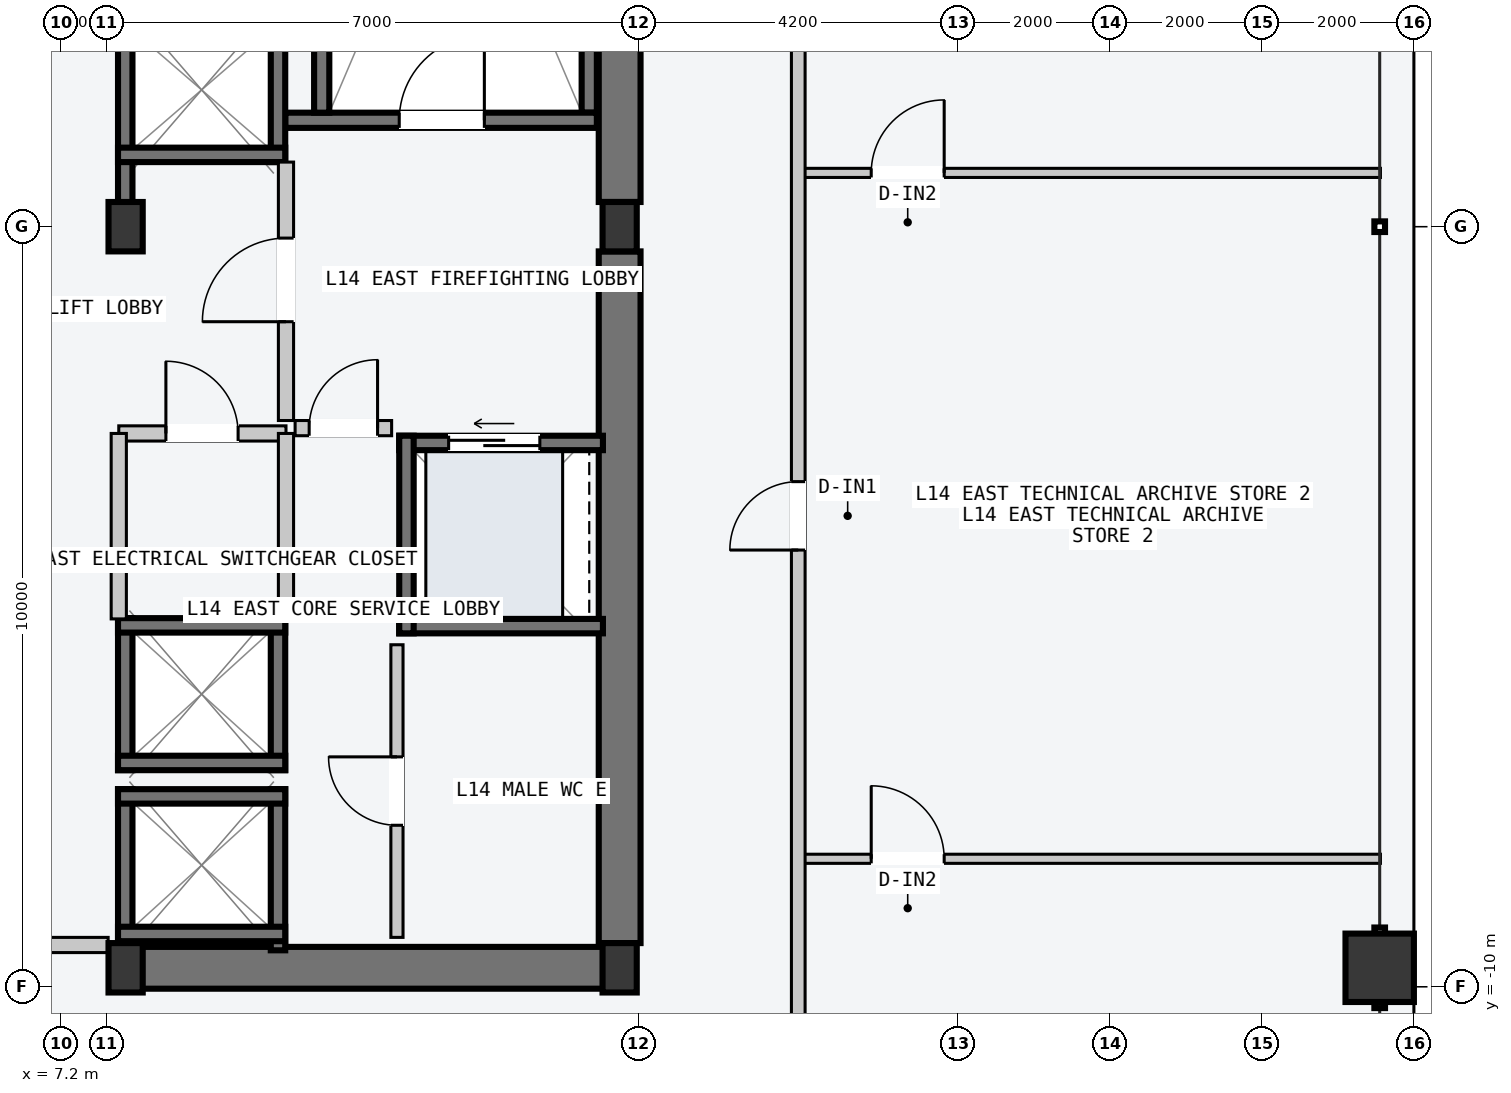
"""IFC4 building model, lengths in metres.
Left out: names, types, materials, properties, quantities, classifications, styles, units other than length and angle.
Written with IfcOpenShell. Run it as: python <this file> out.ifc"""

import sys

from ifc_helpers import new_model, si_unit, direction, frame, frame_2d, origin, origin_2d, place, context, subcontext, project, spatial, rectangle, hollow_rectangle, i_section, extrude, element, fill, save


model = new_model("IFC4")
c1 = context("Model", 3, precision=1e-05, world=origin(), true_north=direction((0.0, 1.0)))
c2 = subcontext(c1, "Body", "Model", "MODEL_VIEW")
j1 = project(units=[si_unit("LENGTHUNIT", "METRE"), si_unit("PLANEANGLEUNIT", "RADIAN")], contexts=[c1])
p1 = place(None, origin())
s1 = spatial("IfcSite", under=j1, at=p1, CompositionType="ELEMENT")
p2 = place(p1, origin())
s2 = spatial("IfcBuilding", under=s1, at=p2, CompositionType="ELEMENT")
p3 = place(p2, frame((0.0, 0.0, 56.4)))
s3 = spatial("IfcBuildingStorey", under=s2, at=p3, CompositionType="ELEMENT", Elevation=56.4)
p4 = place(p3, frame((8.07, -9.75, -0.2), z_axis=(0.0, 0.0, 1.0), x_axis=(1.0, 0.0, 0.0)))
e1 = element("IfcWall", 1, at=p4, inside=s3, PredefinedType="SHEAR", context=c2, shape_type="SweptSolid", body=[
    extrude(rectangle(XDim=6.46, YDim=0.55, at=frame_2d((3.23, 0.0))), origin(), (0.0, 0.0, 1.0), 3.6),
])
for number, where, z_axis, x_axis in (
    (2, (14.55, -9.425, -0.2), (0.0, 0.0, 1.0), (0.0, 1.0, 0.0)),
    (3, (14.55, 0.325, -0.2), (0.0, 0.0, 1.0), (0.0, 1.0, 0.0)),
):
    element("IfcWall", number, at=place(p3, frame(where, z_axis=z_axis, x_axis=x_axis)), inside=s3, PredefinedType="SHEAR", context=c2, shape_type="SweptSolid", body=[
        extrude(rectangle(XDim=9.1, YDim=0.55, at=frame_2d((4.55, 0.0))), origin(), (0.0, 0.0, 1.0), 3.6),
    ])
p5 = place(p3, frame((14.15, 1.5, -0.2), z_axis=(0.0, 0.0, 1.0), x_axis=(0.0, 1.0, 0.0)))
e4 = element("IfcWall", 4, at=p5, inside=s3, PredefinedType="SOLIDWALL", context=c2, shape_type="SweptSolid", body=[
    extrude(rectangle(XDim=7.8, YDim=0.2, at=frame_2d((3.9, 0.0))), origin(), (0.0, 0.0, 1.0), 3.6),
])
p6 = place(p3, frame((10.15, 1.4, -0.2), z_axis=(0.0, 0.0, 1.0), x_axis=(1.0, 0.0, 0.0)))
e5 = element("IfcWall", 5, at=p6, inside=s3, PredefinedType="SOLIDWALL", context=c2, shape_type="SweptSolid", body=[
    extrude(rectangle(XDim=4.1, YDim=0.2, at=frame_2d((2.05, 0.0))), origin(), (0.0, 0.0, 1.0), 3.6),
])
p7 = place(p6, frame((1.5, 0.0, 0.2)))
e6 = element("IfcOpeningElement", 6, at=p7, cuts=e5, PredefinedType="OPENING", context=c2, shape_type="SweptSolid", body=[
    extrude(rectangle(XDim=1.12, YDim=2.18, at=frame_2d((0.56, 1.09))), frame((0.0, 0.11, 0.0), z_axis=(0.0, -1.0, 0.0), x_axis=(1.0, 0.0, 0.0)), (0.0, 0.0, 1.0), 0.22),
])
p8 = place(p3, frame((10.63, 1.5, -0.2), z_axis=(0.0, 0.0, 1.0), x_axis=(0.0, 1.0, 0.0)))
e7 = element("IfcWall", 7, at=p8, inside=s3, PredefinedType="SOLIDWALL", context=c2, shape_type="SweptSolid", body=[
    extrude(rectangle(XDim=7.8, YDim=0.2, at=frame_2d((3.9, 0.0))), origin(), (0.0, 0.0, 1.0), 3.6),
])
for number, where, z_axis, x_axis in (
    (8, (8.05, -9.75, 0.0), (0.0, 0.0, 1.0), (1.0, 0.0, 0.0)),
    (9, (8.05, 0.0, 0.0), (0.0, 0.0, 1.0), (1.0, 0.0, 0.0)),
    (10, (14.55, -9.75, 0.0), (0.0, 0.0, 1.0), (1.0, 0.0, 0.0)),
    (11, (14.55, 0.0, 0.0), (0.0, 0.0, 1.0), (1.0, 0.0, 0.0)),
):
    element("IfcColumn", number, at=place(p3, frame(where, z_axis=z_axis, x_axis=x_axis)), inside=s3, PredefinedType="COLUMN", context=c2, shape_type="SweptSolid", body=[
        extrude(i_section(OverallWidth=0.45, OverallDepth=0.65, WebThickness=0.025, FlangeThickness=0.04, at=origin_2d()), origin(), (0.0, 0.0, 1.0), 3.6),
    ])
p9 = place(p3, frame((24.55, -9.75, 0.0), z_axis=(0.0, 0.0, 1.0), x_axis=(0.0, 1.0, 0.0)))
e12 = element("IfcColumn", 12, at=p9, inside=s3, PredefinedType="COLUMN", context=c2, shape_type="SweptSolid", body=[
    extrude(hollow_rectangle(XDim=0.9, YDim=0.9, WallThickness=0.045, at=origin_2d()), origin(), (0.0, 0.0, 1.0), 3.6),
])
p10 = place(p3, frame((8.045, 0.21, -0.2), z_axis=(0.0, 0.0, 1.0), x_axis=(0.0, 1.0, 0.0)))
e13 = element("IfcWall", 13, at=p10, inside=s3, PredefinedType="SOLIDWALL", context=c2, shape_type="SweptSolid", body=[
    extrude(rectangle(XDim=2.54, YDim=0.19, at=frame_2d((1.27, 0.0))), origin(), (0.0, 0.0, 1.0), 3.6),
])
p11 = place(p3, frame((10.055, 0.85, -0.2), z_axis=(0.0, 0.0, 1.0), x_axis=(0.0, 1.0, 0.0)))
e14 = element("IfcWall", 14, at=p11, inside=s3, PredefinedType="SOLIDWALL", context=c2, shape_type="SweptSolid", body=[
    extrude(rectangle(XDim=1.9, YDim=0.19, at=frame_2d((0.95, 0.0))), origin(), (0.0, 0.0, 1.0), 3.6),
])
p12 = place(p3, frame((7.95, 0.945, -0.2), z_axis=(0.0, 0.0, 1.0), x_axis=(1.0, 0.0, 0.0)))
e15 = element("IfcWall", 15, at=p12, inside=s3, PredefinedType="SOLIDWALL", context=c2, shape_type="SweptSolid", body=[
    extrude(rectangle(XDim=2.2, YDim=0.19, at=frame_2d((1.1, 0.0))), origin(), (0.0, 0.0, 1.0), 3.6),
])
for number, where, z_axis, x_axis in (
    (16, (8.045, -9.52, -0.2), (0.0, 0.0, 1.0), (0.0, 1.0, 0.0)),
    (17, (10.055, -9.52, -0.2), (0.0, 0.0, 1.0), (0.0, 1.0, 0.0)),
):
    element("IfcWall", number, at=place(p3, frame(where, z_axis=z_axis, x_axis=x_axis)), inside=s3, PredefinedType="SOLIDWALL", context=c2, shape_type="SweptSolid", body=[
        extrude(rectangle(XDim=2.12, YDim=0.19, at=frame_2d((1.06, 0.0))), origin(), (0.0, 0.0, 1.0), 3.6),
    ])
for number, where, z_axis, x_axis in (
    (18, (7.95, -7.495, -0.2), (0.0, 0.0, 1.0), (1.0, 0.0, 0.0)),
    (19, (7.95, -9.305, -0.2), (0.0, 0.0, 1.0), (1.0, 0.0, 0.0)),
):
    element("IfcWall", number, at=place(p3, frame(where, z_axis=z_axis, x_axis=x_axis)), inside=s3, PredefinedType="SOLIDWALL", context=c2, shape_type="SweptSolid", body=[
        extrude(rectangle(XDim=2.2, YDim=0.19, at=frame_2d((1.1, 0.0))), origin(), (0.0, 0.0, 1.0), 3.6),
    ])
for number, where, z_axis, x_axis in (
    (20, (8.045, -7.15, -0.2), (0.0, 0.0, 1.0), (0.0, 1.0, 0.0)),
    (21, (10.055, -7.15, -0.2), (0.0, 0.0, 1.0), (0.0, 1.0, 0.0)),
):
    element("IfcWall", number, at=place(p3, frame(where, z_axis=z_axis, x_axis=x_axis)), inside=s3, PredefinedType="SOLIDWALL", context=c2, shape_type="SweptSolid", body=[
        extrude(rectangle(XDim=2.0, YDim=0.19, at=frame_2d((1.0, 0.0))), origin(), (0.0, 0.0, 1.0), 3.6),
    ])
for number, where, z_axis, x_axis in (
    (22, (7.95, -5.245, -0.2), (0.0, 0.0, 1.0), (1.0, 0.0, 0.0)),
    (23, (7.95, -7.055, -0.2), (0.0, 0.0, 1.0), (1.0, 0.0, 0.0)),
):
    element("IfcWall", number, at=place(p3, frame(where, z_axis=z_axis, x_axis=x_axis)), inside=s3, PredefinedType="SOLIDWALL", context=c2, shape_type="SweptSolid", body=[
        extrude(rectangle(XDim=2.2, YDim=0.19, at=frame_2d((1.1, 0.0))), origin(), (0.0, 0.0, 1.0), 3.6),
    ])
p13 = place(p3, frame((11.65, -2.845, -0.2), z_axis=(0.0, 0.0, 1.0), x_axis=(1.0, 0.0, 0.0)))
e24 = element("IfcWall", 24, at=p13, inside=s3, PredefinedType="SOLIDWALL", context=c2, shape_type="SweptSolid", body=[
    extrude(rectangle(XDim=2.68, YDim=0.19, at=frame_2d((1.34, 0.0))), origin(), (0.0, 0.0, 1.0), 3.6),
])
p14 = place(p13, frame((0.65, 0.0, 0.2)))
e25 = element("IfcOpeningElement", 25, at=p14, cuts=e24, PredefinedType="OPENING", context=c2, shape_type="SweptSolid", body=[
    extrude(rectangle(XDim=1.2, YDim=2.2, at=frame_2d((0.6, 1.1))), frame((0.0, 0.105, 0.0), z_axis=(0.0, -1.0, 0.0), x_axis=(1.0, 0.0, 0.0)), (0.0, 0.0, 1.0), 0.21),
])
p15 = place(p3, frame((11.65, -5.255, -0.2), z_axis=(0.0, 0.0, 1.0), x_axis=(1.0, 0.0, 0.0)))
e26 = element("IfcWall", 26, at=p15, inside=s3, PredefinedType="SOLIDWALL", context=c2, shape_type="SweptSolid", body=[
    extrude(rectangle(XDim=2.68, YDim=0.19, at=frame_2d((1.34, 0.0))), origin(), (0.0, 0.0, 1.0), 3.6),
])
p16 = place(p3, frame((11.745, -5.35, -0.2), z_axis=(0.0, 0.0, 1.0), x_axis=(0.0, 1.0, 0.0)))
e27 = element("IfcWall", 27, at=p16, inside=s3, PredefinedType="SOLIDWALL", context=c2, shape_type="SweptSolid", body=[
    extrude(rectangle(XDim=2.6, YDim=0.19, at=frame_2d((1.3, 0.0))), origin(), (0.0, 0.0, 1.0), 3.6),
])
p17 = place(p3, frame((6.02, -9.45, 0.0), z_axis=(0.0, 0.0, 1.0), x_axis=(1.0, 0.0, 0.0)))
e28 = element("IfcWall", 28, at=p17, inside=s3, PredefinedType="PARTITIONING", context=c2, shape_type="SweptSolid", body=[
    extrude(rectangle(XDim=1.8, YDim=0.2, at=frame_2d((0.9, 0.0))), origin(), (0.0, 0.0, 1.0), 3.4),
])
p18 = place(p3, frame((10.16, -2.55, 0.0), z_axis=(0.0, 0.0, 1.0), x_axis=(0.0, 1.0, 0.0)))
e29 = element("IfcWall", 29, at=p18, inside=s3, PredefinedType="PARTITIONING", context=c2, shape_type="SweptSolid", body=[
    extrude(rectangle(XDim=3.4, YDim=0.2, at=frame_2d((1.7, 0.0))), origin(), (0.0, 0.0, 1.0), 3.4),
])
p19 = place(p18, frame((1.3, 0.0, 0.0)))
e30 = element("IfcOpeningElement", 30, at=p19, cuts=e29, PredefinedType="OPENING", context=c2, shape_type="SweptSolid", body=[
    extrude(rectangle(XDim=1.1, YDim=2.15, at=frame_2d((0.55, 1.075))), frame((0.0, 0.11, 0.0), z_axis=(0.0, -1.0, 0.0), x_axis=(1.0, 0.0, 0.0)), (0.0, 0.0, 1.0), 0.22),
])
p20 = place(p3, frame((10.28, -2.65, 0.0), z_axis=(0.0, 0.0, 1.0), x_axis=(1.0, 0.0, 0.0)))
e31 = element("IfcWall", 31, at=p20, inside=s3, PredefinedType="PARTITIONING", context=c2, shape_type="SweptSolid", body=[
    extrude(rectangle(XDim=1.27, YDim=0.2, at=frame_2d((0.635, 0.0))), origin(), (0.0, 0.0, 1.0), 3.4),
])
p21 = place(p20, frame((0.185, 0.0, 0.0)))
e32 = element("IfcOpeningElement", 32, at=p21, cuts=e31, PredefinedType="OPENING", context=c2, shape_type="SweptSolid", body=[
    extrude(rectangle(XDim=0.9, YDim=2.15, at=frame_2d((0.45, 1.075))), frame((0.0, 0.11, 0.0), z_axis=(0.0, -1.0, 0.0), x_axis=(1.0, 0.0, 0.0)), (0.0, 0.0, 1.0), 0.22),
])
p22 = place(p3, frame((7.96, -2.72, 0.0), z_axis=(0.0, 0.0, 1.0), x_axis=(1.0, 0.0, 0.0)))
e33 = element("IfcWall", 33, at=p22, inside=s3, PredefinedType="PARTITIONING", context=c2, shape_type="SweptSolid", body=[
    extrude(rectangle(XDim=2.2, YDim=0.2, at=frame_2d((1.1, 0.0))), origin(), (0.0, 0.0, 1.0), 3.4),
])
p23 = place(p22, frame((0.62, 0.0, 0.0)))
e34 = element("IfcOpeningElement", 34, at=p23, cuts=e33, PredefinedType="OPENING", context=c2, shape_type="SweptSolid", body=[
    extrude(rectangle(XDim=0.95, YDim=2.1, at=frame_2d((0.475, 1.05))), frame((0.0, 0.11, 0.0), z_axis=(0.0, -1.0, 0.0), x_axis=(1.0, 0.0, 0.0)), (0.0, 0.0, 1.0), 0.22),
])
for number, where, z_axis, x_axis in (
    (35, (7.96, -5.16, 0.0), (0.0, 0.0, 1.0), (0.0, 1.0, 0.0)),
    (36, (10.16, -5.16, 0.0), (0.0, 0.0, 1.0), (0.0, 1.0, 0.0)),
):
    element("IfcWall", number, at=place(p3, frame(where, z_axis=z_axis, x_axis=x_axis)), inside=s3, PredefinedType="PARTITIONING", context=c2, shape_type="SweptSolid", body=[
        extrude(rectangle(XDim=2.44, YDim=0.2, at=frame_2d((1.22, 0.0))), origin(), (0.0, 0.0, 1.0), 3.4),
    ])
p24 = place(p3, frame((11.62, -9.35, 0.0), z_axis=(0.0, 0.0, 1.0), x_axis=(0.0, 1.0, 0.0)))
e37 = element("IfcWall", 37, at=p24, inside=s3, PredefinedType="PARTITIONING", context=c2, shape_type="SweptSolid", body=[
    extrude(rectangle(XDim=3.85, YDim=0.16, at=frame_2d((1.925, 0.0))), origin(), (0.0, 0.0, 1.0), 3.4),
])
p25 = place(p24, frame((1.475, 0.0, 0.0)))
e38 = element("IfcOpeningElement", 38, at=p25, cuts=e37, PredefinedType="OPENING", context=c2, shape_type="SweptSolid", body=[
    extrude(rectangle(XDim=0.9, YDim=2.15, at=frame_2d((0.45, 1.075))), frame((0.0, 0.09, 0.0), z_axis=(0.0, -1.0, 0.0), x_axis=(1.0, 0.0, 0.0)), (0.0, 0.0, 1.0), 0.18),
])
p26 = place(p3, frame((16.96, -8.316, 0.0), z_axis=(0.0, 0.0, 1.0), x_axis=(1.0, 0.0, 0.0)))
e39 = element("IfcWall", 39, at=p26, inside=s3, PredefinedType="PARTITIONING", context=c2, shape_type="SweptSolid", body=[
    extrude(rectangle(XDim=7.6, YDim=0.12, at=frame_2d((3.8, 0.0))), origin(), (0.0, 0.0, 1.0), 3.4),
])
p27 = place(p26, frame((0.9, 0.0, 0.0)))
e40 = element("IfcOpeningElement", 40, at=p27, cuts=e39, PredefinedType="OPENING", context=c2, shape_type="SweptSolid", body=[
    extrude(rectangle(XDim=0.96, YDim=2.18, at=frame_2d((0.48, 1.09))), frame((0.0, 0.07, 0.0), z_axis=(0.0, -1.0, 0.0), x_axis=(1.0, 0.0, 0.0)), (0.0, 0.0, 1.0), 0.14),
])
p28 = place(p3, frame((16.96, 0.708, 0.0), z_axis=(0.0, 0.0, 1.0), x_axis=(1.0, 0.0, 0.0)))
e41 = element("IfcWall", 41, at=p28, inside=s3, PredefinedType="PARTITIONING", context=c2, shape_type="SweptSolid", body=[
    extrude(rectangle(XDim=7.6, YDim=0.12, at=frame_2d((3.8, 0.0))), origin(), (0.0, 0.0, 1.0), 3.4),
])
p29 = place(p28, frame((0.9, 0.0, 0.0)))
e42 = element("IfcOpeningElement", 42, at=p29, cuts=e41, PredefinedType="OPENING", context=c2, shape_type="SweptSolid", body=[
    extrude(rectangle(XDim=0.96, YDim=2.18, at=frame_2d((0.48, 1.09))), frame((0.0, 0.07, 0.0), z_axis=(0.0, -1.0, 0.0), x_axis=(1.0, 0.0, 0.0)), (0.0, 0.0, 1.0), 0.14),
])
p30 = place(p3, frame((16.9, -14.42, 0.0), z_axis=(0.0, 0.0, 1.0), x_axis=(0.0, 1.0, 0.0)))
e43 = element("IfcWall", 43, at=p30, inside=s3, PredefinedType="PARTITIONING", context=c2, shape_type="SweptSolid", body=[
    extrude(rectangle(XDim=26.54, YDim=0.18, at=frame_2d((13.27, 0.0))), origin(), (0.0, 0.0, 1.0), 3.4),
])
p31 = place(p30, frame((2.352, 0.0, 0.0)))
e44 = element("IfcOpeningElement", 44, at=p31, cuts=e43, PredefinedType="OPENING", context=c2, shape_type="SweptSolid", body=[
    extrude(rectangle(XDim=1.4, YDim=2.2, at=frame_2d((0.7, 1.1))), frame((0.0, 0.1, 0.0), z_axis=(0.0, -1.0, 0.0), x_axis=(1.0, 0.0, 0.0)), (0.0, 0.0, 1.0), 0.2),
])
p32 = place(p30, frame((10.166, 0.0, 0.0)))
e45 = element("IfcOpeningElement", 45, at=p32, cuts=e43, PredefinedType="OPENING", context=c2, shape_type="SweptSolid", body=[
    extrude(rectangle(XDim=0.9, YDim=2.15, at=frame_2d((0.45, 1.075))), frame((0.0, 0.1, 0.0), z_axis=(0.0, -1.0, 0.0), x_axis=(1.0, 0.0, 0.0)), (0.0, 0.0, 1.0), 0.2),
])
p33 = place(p30, frame((20.354, 0.0, 0.0)))
e46 = element("IfcOpeningElement", 46, at=p33, cuts=e43, PredefinedType="OPENING", context=c2, shape_type="SweptSolid", body=[
    extrude(rectangle(XDim=0.96, YDim=2.18, at=frame_2d((0.48, 1.09))), frame((0.0, 0.1, 0.0), z_axis=(0.0, -1.0, 0.0), x_axis=(1.0, 0.0, 0.0)), (0.0, 0.0, 1.0), 0.2),
])
p34 = place(p7, origin())
e47 = element("IfcDoor", 47, at=p34, inside=s3, OperationType="SINGLE_SWING_RIGHT", PredefinedType="DOOR", context=c2, shape_type="SweptSolid", body=[
    extrude(rectangle(XDim=1.12, YDim=2.18, at=frame_2d((0.56, 1.09))), frame((0.0, 0.025, 0.0), z_axis=(0.0, -1.0, 0.0), x_axis=(1.0, 0.0, 0.0)), (0.0, 0.0, 1.0), 0.05),
])
fill(e6, e47)
p35 = place(p14, origin())
e48 = element("IfcDoor", 48, at=p35, inside=s3, OperationType="SLIDING_TO_LEFT", PredefinedType="DOOR", context=c2, shape_type="SweptSolid", body=[
    extrude(rectangle(XDim=1.2, YDim=2.2, at=frame_2d((0.6, 1.1))), frame((0.0, 0.025, 0.0), z_axis=(0.0, -1.0, 0.0), x_axis=(1.0, 0.0, 0.0)), (0.0, 0.0, 1.0), 0.05),
])
fill(e25, e48)
p36 = place(p19, origin())
e49 = element("IfcDoor", 49, at=p36, inside=s3, OperationType="SINGLE_SWING_LEFT", PredefinedType="DOOR", context=c2, shape_type="SweptSolid", body=[
    extrude(rectangle(XDim=1.1, YDim=2.15, at=frame_2d((0.55, 1.075))), frame((0.0, 0.025, 0.0), z_axis=(0.0, -1.0, 0.0), x_axis=(1.0, 0.0, 0.0)), (0.0, 0.0, 1.0), 0.05),
])
fill(e30, e49)
p37 = place(p21, origin())
e50 = element("IfcDoor", 50, at=p37, inside=s3, OperationType="SINGLE_SWING_RIGHT", PredefinedType="DOOR", context=c2, shape_type="SweptSolid", body=[
    extrude(rectangle(XDim=0.9, YDim=2.15, at=frame_2d((0.45, 1.075))), frame((0.0, 0.025, 0.0), z_axis=(0.0, -1.0, 0.0), x_axis=(1.0, 0.0, 0.0)), (0.0, 0.0, 1.0), 0.05),
])
fill(e32, e50)
p38 = place(p23, origin())
e51 = element("IfcDoor", 51, at=p38, inside=s3, OperationType="SINGLE_SWING_LEFT", PredefinedType="DOOR", context=c2, shape_type="SweptSolid", body=[
    extrude(rectangle(XDim=0.95, YDim=2.1, at=frame_2d((0.475, 1.05))), frame((0.0, 0.025, 0.0), z_axis=(0.0, -1.0, 0.0), x_axis=(1.0, 0.0, 0.0)), (0.0, 0.0, 1.0), 0.05),
])
fill(e34, e51)
p39 = place(p25, origin())
e52 = element("IfcDoor", 52, at=p39, inside=s3, OperationType="SINGLE_SWING_RIGHT", PredefinedType="DOOR", context=c2, shape_type="SweptSolid", body=[
    extrude(rectangle(XDim=0.9, YDim=2.15, at=frame_2d((0.45, 1.075))), frame((0.0, 0.025, 0.0), z_axis=(0.0, -1.0, 0.0), x_axis=(1.0, 0.0, 0.0)), (0.0, 0.0, 1.0), 0.05),
])
fill(e38, e52)
p40 = place(p27, origin())
e53 = element("IfcDoor", 53, at=p40, inside=s3, OperationType="SINGLE_SWING_LEFT", PredefinedType="DOOR", context=c2, shape_type="SweptSolid", body=[
    extrude(rectangle(XDim=0.96, YDim=2.18, at=frame_2d((0.48, 1.09))), frame((0.0, 0.025, 0.0), z_axis=(0.0, -1.0, 0.0), x_axis=(1.0, 0.0, 0.0)), (0.0, 0.0, 1.0), 0.05),
])
fill(e40, e53)
p41 = place(p29, origin())
e54 = element("IfcDoor", 54, at=p41, inside=s3, OperationType="SINGLE_SWING_RIGHT", PredefinedType="DOOR", context=c2, shape_type="SweptSolid", body=[
    extrude(rectangle(XDim=0.96, YDim=2.18, at=frame_2d((0.48, 1.09))), frame((0.0, 0.025, 0.0), z_axis=(0.0, -1.0, 0.0), x_axis=(1.0, 0.0, 0.0)), (0.0, 0.0, 1.0), 0.05),
])
fill(e42, e54)
p42 = place(p32, origin())
e55 = element("IfcDoor", 55, at=p42, inside=s3, OperationType="SINGLE_SWING_LEFT", PredefinedType="DOOR", context=c2, shape_type="SweptSolid", body=[
    extrude(rectangle(XDim=0.9, YDim=2.15, at=frame_2d((0.45, 1.075))), frame((0.0, 0.025, 0.0), z_axis=(0.0, -1.0, 0.0), x_axis=(1.0, 0.0, 0.0)), (0.0, 0.0, 1.0), 0.05),
])
fill(e45, e55)
save(model, sys.argv[1])
